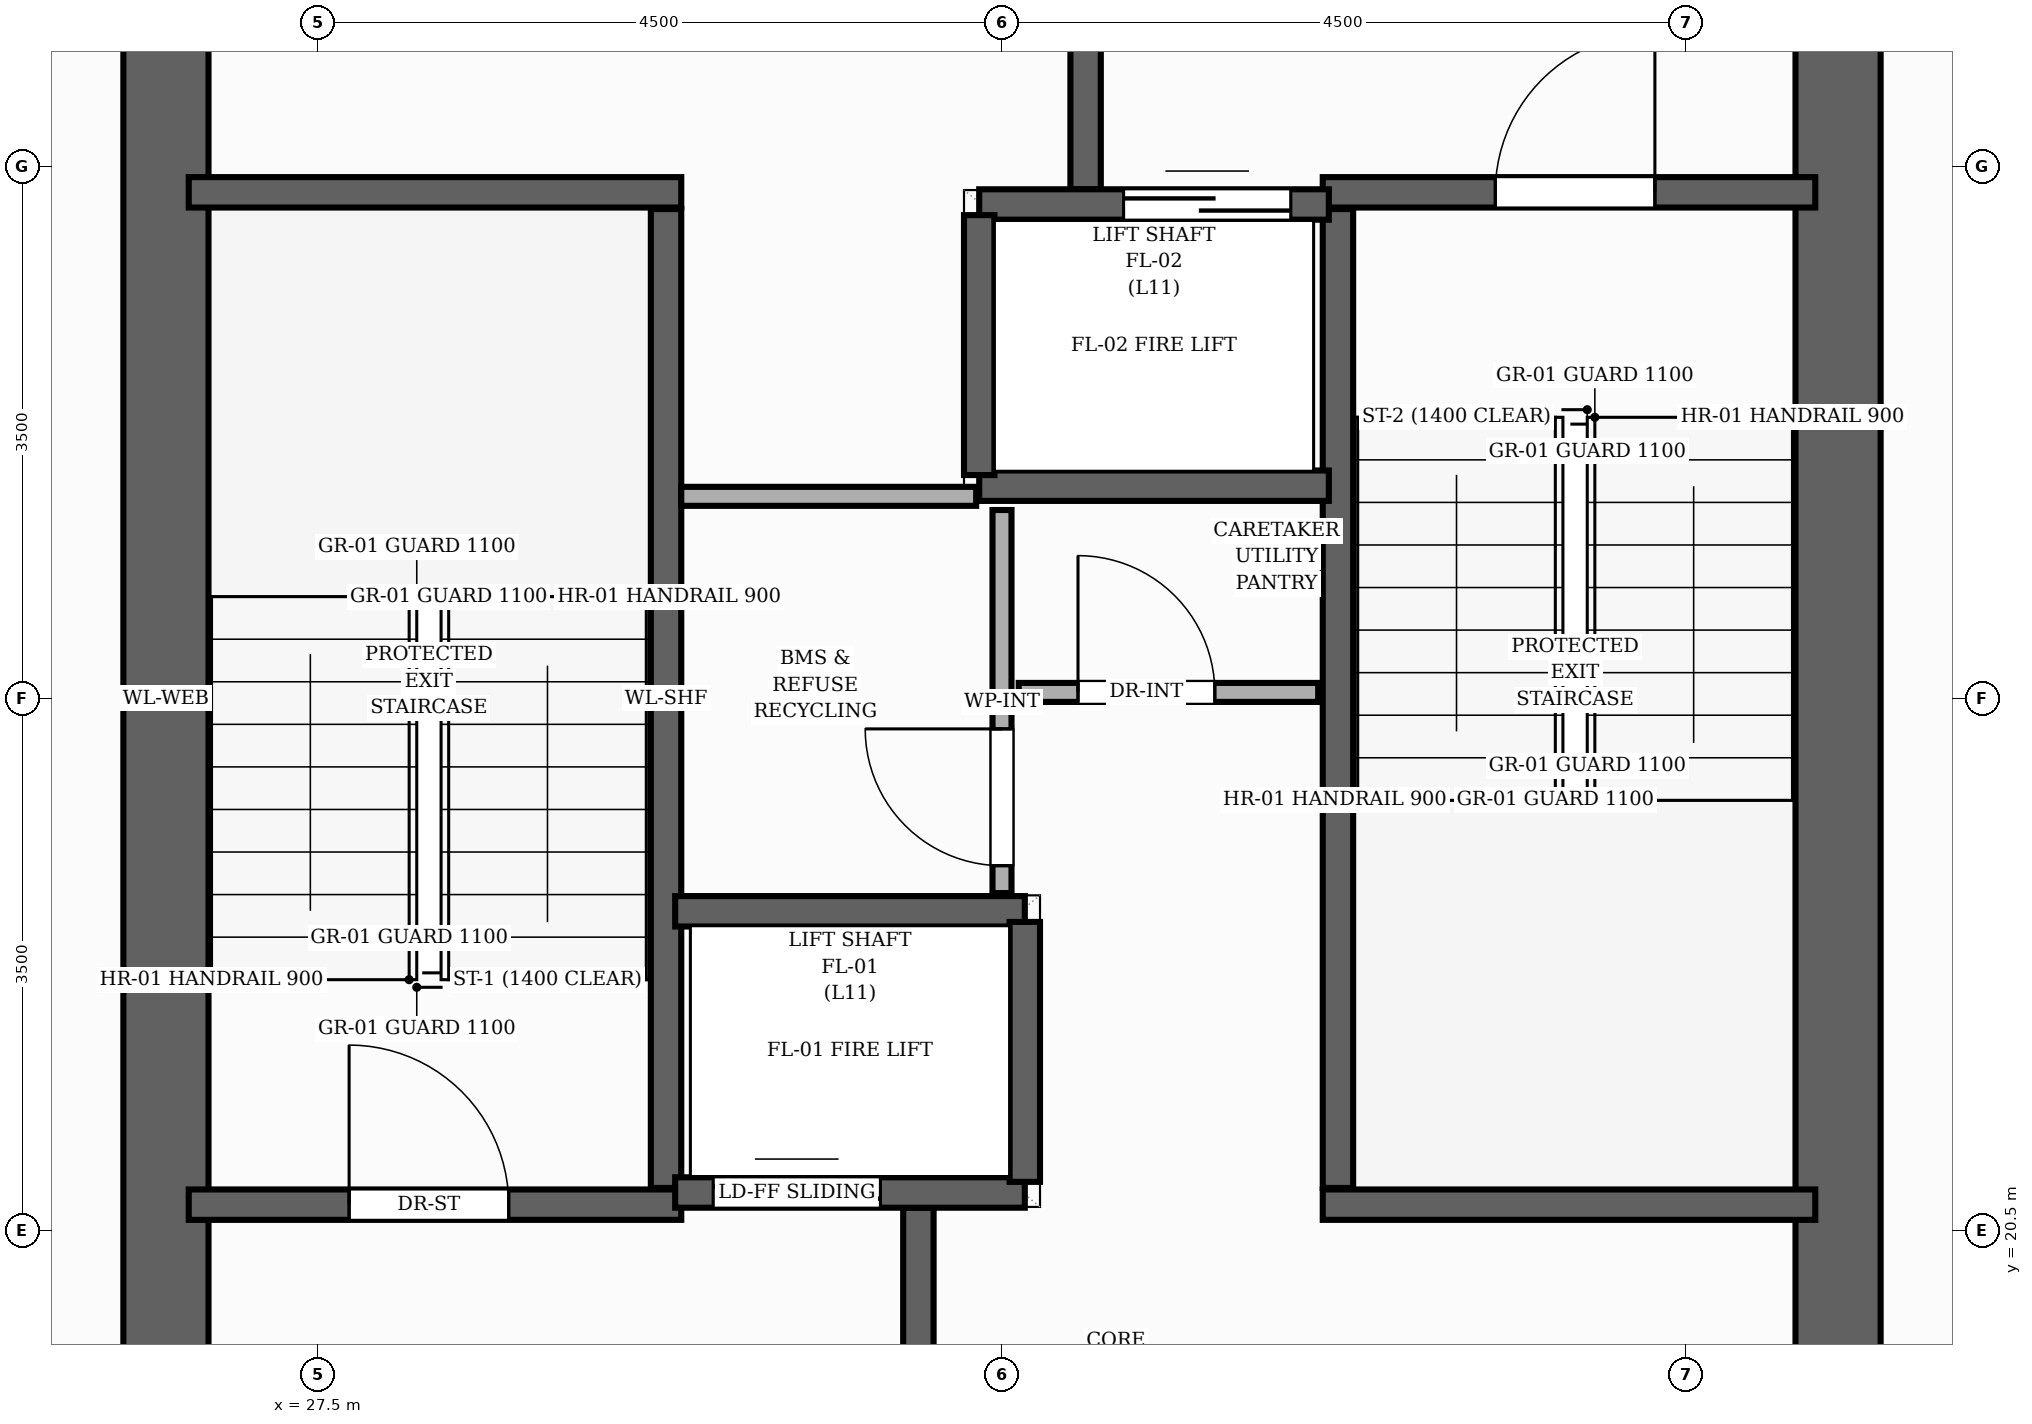
"""IFC4 building model, lengths in metres.
Left out: names, types, materials, properties, quantities, classifications, styles, units other than length and angle.
Written with IfcOpenShell. Run it as: python <this file> out.ifc"""

import sys

from ifc_helpers import new_model, si_unit, direction, frame, frame_2d, origin, place, context, subcontext, project, spatial, rectangle, extrude, element, fill, save


model = new_model("IFC4")
c1 = context("Model", 3, precision=1e-05, world=origin(), true_north=direction((0.0, 1.0)))
c2 = subcontext(c1, "Body", "Model", "MODEL_VIEW")
j1 = project(units=[si_unit("LENGTHUNIT", "METRE"), si_unit("PLANEANGLEUNIT", "RADIAN")], contexts=[c1])
p1 = place(None, origin())
s1 = spatial("IfcSite", under=j1, at=p1, CompositionType="ELEMENT")
p2 = place(p1, origin())
s2 = spatial("IfcBuilding", under=s1, at=p2, CompositionType="ELEMENT")
p3 = place(p2, frame((0.0, 0.0, 37.6)))
s3 = spatial("IfcBuildingStorey", under=s2, at=p3, CompositionType="ELEMENT", Elevation=37.6)
for number, where, z_axis, x_axis in (
    (1, (26.5, 17.4, 0.0), (0.0, 0.0, 1.0), (0.0, 1.0, 0.0)),
    (2, (37.5, 17.4, 0.0), (0.0, 0.0, 1.0), (0.0, 1.0, 0.0)),
):
    element("IfcWall", number, at=place(p3, frame(where, z_axis=z_axis, x_axis=x_axis)), inside=s3, PredefinedType="SHEAR", context=c2, shape_type="SweptSolid", body=[
        extrude(rectangle(XDim=13.2, YDim=0.56, at=frame_2d((6.6, 0.0))), origin(), (0.0, 0.0, 1.0), 3.2),
    ])
p4 = place(p3, frame((29.79, 20.78, 0.0), z_axis=(0.0, 0.0, 1.0), x_axis=(0.0, 1.0, 0.0)))
e3 = element("IfcWall", 3, at=p4, inside=s3, PredefinedType="SHEAR", context=c2, shape_type="SweptSolid", body=[
    extrude(rectangle(XDim=6.44, YDim=0.2, at=frame_2d((3.22, 0.0))), origin(), (0.0, 0.0, 1.0), 3.2),
])
p5 = place(p3, frame((26.65, 27.33, 0.0), z_axis=(0.0, 0.0, 1.0), x_axis=(1.0, 0.0, 0.0)))
e4 = element("IfcWall", 4, at=p5, inside=s3, PredefinedType="SHEAR", context=c2, shape_type="SweptSolid", body=[
    extrude(rectangle(XDim=3.24, YDim=0.2, at=frame_2d((1.62, 0.0))), origin(), (0.0, 0.0, 1.0), 3.2),
])
p6 = place(p3, frame((26.65, 20.67, 0.0), z_axis=(0.0, 0.0, 1.0), x_axis=(1.0, 0.0, 0.0)))
e5 = element("IfcWall", 5, at=p6, inside=s3, PredefinedType="SHEAR", context=c2, shape_type="SweptSolid", body=[
    extrude(rectangle(XDim=3.24, YDim=0.2, at=frame_2d((1.62, 0.0))), origin(), (0.0, 0.0, 1.0), 3.2),
])
p7 = place(p6, frame((1.055, 0.0, 0.0)))
e6 = element("IfcOpeningElement", 6, at=p7, cuts=e5, PredefinedType="OPENING", context=c2, shape_type="SweptSolid", body=[
    extrude(rectangle(XDim=1.05, YDim=2.15, at=frame_2d((0.525, 1.075))), frame((0.0, 0.11, 0.0), z_axis=(0.0, -1.0, 0.0), x_axis=(1.0, 0.0, 0.0)), (0.0, 0.0, 1.0), 0.22),
])
p8 = place(p3, frame((34.21, 20.78, 0.0), z_axis=(0.0, 0.0, 1.0), x_axis=(0.0, 1.0, 0.0)))
e7 = element("IfcWall", 7, at=p8, inside=s3, PredefinedType="SHEAR", context=c2, shape_type="SweptSolid", body=[
    extrude(rectangle(XDim=6.44, YDim=0.2, at=frame_2d((3.22, 0.0))), origin(), (0.0, 0.0, 1.0), 3.2),
])
p9 = place(p3, frame((34.11, 20.67, 0.0), z_axis=(0.0, 0.0, 1.0), x_axis=(1.0, 0.0, 0.0)))
e8 = element("IfcWall", 8, at=p9, inside=s3, PredefinedType="SHEAR", context=c2, shape_type="SweptSolid", body=[
    extrude(rectangle(XDim=3.24, YDim=0.2, at=frame_2d((1.62, 0.0))), origin(), (0.0, 0.0, 1.0), 3.2),
])
p10 = place(p3, frame((34.11, 27.33, 0.0), z_axis=(0.0, 0.0, 1.0), x_axis=(1.0, 0.0, 0.0)))
e9 = element("IfcWall", 9, at=p10, inside=s3, PredefinedType="SHEAR", context=c2, shape_type="SweptSolid", body=[
    extrude(rectangle(XDim=3.24, YDim=0.2, at=frame_2d((1.62, 0.0))), origin(), (0.0, 0.0, 1.0), 3.2),
])
p11 = place(p10, frame((1.135, 0.0, 0.0)))
e10 = element("IfcOpeningElement", 10, at=p11, cuts=e9, PredefinedType="OPENING", context=c2, shape_type="SweptSolid", body=[
    extrude(rectangle(XDim=1.05, YDim=2.15, at=frame_2d((0.525, 1.075))), frame((0.0, 0.11, 0.0), z_axis=(0.0, -1.0, 0.0), x_axis=(1.0, 0.0, 0.0)), (0.0, 0.0, 1.0), 0.22),
])
for number, where, z_axis, x_axis in (
    (11, (31.45, 17.15, 0.0), (0.0, 0.0, 1.0), (0.0, 1.0, 0.0)),
    (12, (32.55, 27.35, 0.0), (0.0, 0.0, 1.0), (0.0, 1.0, 0.0)),
):
    element("IfcWall", number, at=place(p3, frame(where, z_axis=z_axis, x_axis=x_axis)), inside=s3, PredefinedType="SHEAR", context=c2, shape_type="SweptSolid", body=[
        extrude(rectangle(XDim=3.5, YDim=0.2, at=frame_2d((1.75, 0.0))), origin(), (0.0, 0.0, 1.0), 3.2),
    ])
p12 = place(p3, frame((29.85, 20.75, 0.0), z_axis=(0.0, 0.0, 1.0), x_axis=(1.0, 0.0, 0.0)))
e13 = element("IfcWall", 13, at=p12, inside=s3, PredefinedType="SHEAR", context=c2, shape_type="SweptSolid", body=[
    extrude(rectangle(XDim=2.3, YDim=0.2, at=frame_2d((1.15, 0.0))), origin(), (0.0, 0.0, 1.0), 3.2),
])
p13 = place(p12, frame((0.25, 0.0, 0.0)))
e14 = element("IfcOpeningElement", 14, at=p13, cuts=e13, PredefinedType="OPENING", context=c2, shape_type="SweptSolid", body=[
    extrude(rectangle(XDim=1.1, YDim=2.15, at=frame_2d((0.55, 1.075))), frame((0.0, 0.11, 0.0), z_axis=(0.0, -1.0, 0.0), x_axis=(1.0, 0.0, 0.0)), (0.0, 0.0, 1.0), 0.22),
])
p14 = place(p3, frame((29.85, 22.6, 0.0), z_axis=(0.0, 0.0, 1.0), x_axis=(1.0, 0.0, 0.0)))
e15 = element("IfcWall", 15, at=p14, inside=s3, PredefinedType="SHEAR", context=c2, shape_type="SweptSolid", body=[
    extrude(rectangle(XDim=2.3, YDim=0.2, at=frame_2d((1.15, 0.0))), origin(), (0.0, 0.0, 1.0), 3.2),
])
p15 = place(p3, frame((32.15, 20.82, 0.0), z_axis=(0.0, 0.0, 1.0), x_axis=(0.0, 1.0, 0.0)))
e16 = element("IfcWall", 16, at=p15, inside=s3, PredefinedType="SHEAR", context=c2, shape_type="SweptSolid", body=[
    extrude(rectangle(XDim=1.71, YDim=0.2, at=frame_2d((0.855, 0.0))), origin(), (0.0, 0.0, 1.0), 3.2),
])
p16 = place(p3, frame((31.85, 27.25, 0.0), z_axis=(0.0, 0.0, 1.0), x_axis=(1.0, 0.0, 0.0)))
e17 = element("IfcWall", 17, at=p16, inside=s3, PredefinedType="SHEAR", context=c2, shape_type="SweptSolid", body=[
    extrude(rectangle(XDim=2.3, YDim=0.2, at=frame_2d((1.15, 0.0))), origin(), (0.0, 0.0, 1.0), 3.2),
])
p17 = place(p16, frame((0.95, 0.0, 0.0)))
e18 = element("IfcOpeningElement", 18, at=p17, cuts=e17, PredefinedType="OPENING", context=c2, shape_type="SweptSolid", body=[
    extrude(rectangle(XDim=1.1, YDim=2.15, at=frame_2d((0.55, 1.075))), frame((0.0, 0.11, 0.0), z_axis=(0.0, -1.0, 0.0), x_axis=(1.0, 0.0, 0.0)), (0.0, 0.0, 1.0), 0.22),
])
p18 = place(p3, frame((31.85, 25.4, 0.0), z_axis=(0.0, 0.0, 1.0), x_axis=(1.0, 0.0, 0.0)))
e19 = element("IfcWall", 19, at=p18, inside=s3, PredefinedType="SHEAR", context=c2, shape_type="SweptSolid", body=[
    extrude(rectangle(XDim=2.3, YDim=0.2, at=frame_2d((1.15, 0.0))), origin(), (0.0, 0.0, 1.0), 3.2),
])
p19 = place(p3, frame((31.85, 25.47, 0.0), z_axis=(0.0, 0.0, 1.0), x_axis=(0.0, 1.0, 0.0)))
e20 = element("IfcWall", 20, at=p19, inside=s3, PredefinedType="SHEAR", context=c2, shape_type="SweptSolid", body=[
    extrude(rectangle(XDim=1.71, YDim=0.2, at=frame_2d((0.855, 0.0))), origin(), (0.0, 0.0, 1.0), 3.2),
])
p20 = place(p3, frame((32.0, 22.72, 0.0), z_axis=(0.0, 0.0, 1.0), x_axis=(0.0, 1.0, 0.0)))
e21 = element("IfcWall", 21, at=p20, inside=s3, PredefinedType="PARTITIONING", context=c2, shape_type="SweptSolid", body=[
    extrude(rectangle(XDim=2.52, YDim=0.125, at=frame_2d((1.26, 0.0))), origin(), (0.0, 0.0, 1.0), 2.955),
])
p21 = place(p20, frame((0.18, 0.0, 0.0)))
e22 = element("IfcOpeningElement", 22, at=p21, cuts=e21, PredefinedType="OPENING", context=c2, shape_type="SweptSolid", body=[
    extrude(rectangle(XDim=0.9, YDim=2.1, at=frame_2d((0.45, 1.05))), frame((0.0, 0.073, 0.0), z_axis=(0.0, -1.0, 0.0), x_axis=(1.0, 0.0, 0.0)), (0.0, 0.0, 1.0), 0.145),
])
p22 = place(p3, frame((32.11, 24.04, 0.0), z_axis=(0.0, 0.0, 1.0), x_axis=(1.0, 0.0, 0.0)))
e23 = element("IfcWall", 23, at=p22, inside=s3, PredefinedType="PARTITIONING", context=c2, shape_type="SweptSolid", body=[
    extrude(rectangle(XDim=1.97, YDim=0.125, at=frame_2d((0.985, 0.0))), origin(), (0.0, 0.0, 1.0), 2.955),
])
p23 = place(p22, frame((0.39, 0.0, 0.0)))
e24 = element("IfcOpeningElement", 24, at=p23, cuts=e23, PredefinedType="OPENING", context=c2, shape_type="SweptSolid", body=[
    extrude(rectangle(XDim=0.9, YDim=2.1, at=frame_2d((0.45, 1.05))), frame((0.0, 0.073, 0.0), z_axis=(0.0, -1.0, 0.0), x_axis=(1.0, 0.0, 0.0)), (0.0, 0.0, 1.0), 0.145),
])
p24 = place(p3, frame((29.89, 25.33, 0.0), z_axis=(0.0, 0.0, 1.0), x_axis=(1.0, 0.0, 0.0)))
e25 = element("IfcWall", 25, at=p24, inside=s3, PredefinedType="PARTITIONING", context=c2, shape_type="SweptSolid", body=[
    extrude(rectangle(XDim=1.94, YDim=0.125, at=frame_2d((0.97, 0.0))), origin(), (0.0, 0.0, 1.0), 2.955),
])
p25 = place(p7, origin())
e26 = element("IfcDoor", 26, at=p25, inside=s3, OperationType="SINGLE_SWING_LEFT", PredefinedType="DOOR", context=c2, shape_type="SweptSolid", body=[
    extrude(rectangle(XDim=1.05, YDim=2.15, at=frame_2d((0.525, 1.075))), frame((0.0, 0.025, 0.0), z_axis=(0.0, -1.0, 0.0), x_axis=(1.0, 0.0, 0.0)), (0.0, 0.0, 1.0), 0.05),
])
fill(e6, e26)
p26 = place(p11, origin())
e27 = element("IfcDoor", 27, at=p26, inside=s3, OperationType="SINGLE_SWING_RIGHT", PredefinedType="DOOR", context=c2, shape_type="SweptSolid", body=[
    extrude(rectangle(XDim=1.05, YDim=2.15, at=frame_2d((0.525, 1.075))), frame((0.0, 0.025, 0.0), z_axis=(0.0, -1.0, 0.0), x_axis=(1.0, 0.0, 0.0)), (0.0, 0.0, 1.0), 0.05),
])
fill(e10, e27)
p27 = place(p13, origin())
e28 = element("IfcDoor", 28, at=p27, inside=s3, OperationType="DOUBLE_DOOR_SLIDING", PredefinedType="DOOR", context=c2, shape_type="SweptSolid", body=[
    extrude(rectangle(XDim=1.1, YDim=2.15, at=frame_2d((0.55, 1.075))), frame((0.0, 0.025, 0.0), z_axis=(0.0, -1.0, 0.0), x_axis=(1.0, 0.0, 0.0)), (0.0, 0.0, 1.0), 0.05),
])
fill(e14, e28)
p28 = place(p17, origin())
e29 = element("IfcDoor", 29, at=p28, inside=s3, OperationType="DOUBLE_DOOR_SLIDING", PredefinedType="DOOR", context=c2, shape_type="SweptSolid", body=[
    extrude(rectangle(XDim=1.1, YDim=2.15, at=frame_2d((0.55, 1.075))), frame((0.0, 0.025, 0.0), z_axis=(0.0, -1.0, 0.0), x_axis=(1.0, 0.0, 0.0)), (0.0, 0.0, 1.0), 0.05),
])
fill(e18, e29)
p29 = place(p23, origin())
e30 = element("IfcDoor", 30, at=p29, inside=s3, OperationType="SINGLE_SWING_LEFT", PredefinedType="DOOR", context=c2, shape_type="SweptSolid", body=[
    extrude(rectangle(XDim=0.9, YDim=2.1, at=frame_2d((0.45, 1.05))), frame((0.0, 0.025, 0.0), z_axis=(0.0, -1.0, 0.0), x_axis=(1.0, 0.0, 0.0)), (0.0, 0.0, 1.0), 0.05),
])
fill(e24, e30)
p30 = place(p21, origin())
e31 = element("IfcDoor", 31, at=p30, inside=s3, OperationType="SINGLE_SWING_RIGHT", PredefinedType="DOOR", context=c2, shape_type="SweptSolid", body=[
    extrude(rectangle(XDim=0.9, YDim=2.1, at=frame_2d((0.45, 1.05))), frame((0.0, 0.025, 0.0), z_axis=(0.0, -1.0, 0.0), x_axis=(1.0, 0.0, 0.0)), (0.0, 0.0, 1.0), 0.05),
])
fill(e22, e31)
save(model, sys.argv[1])
